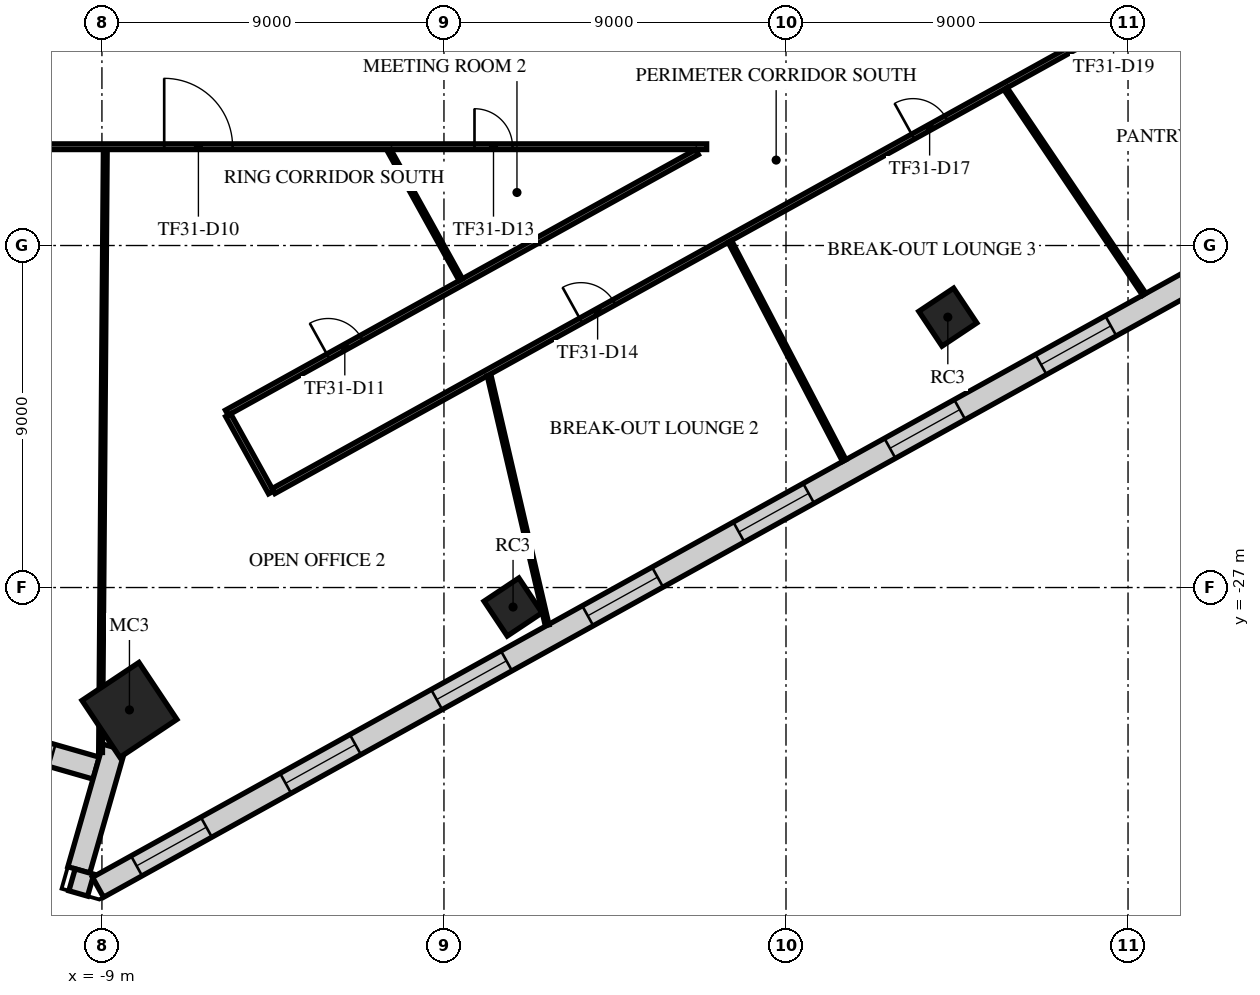
"""IFC4 building model, lengths in metres.
Left out: names, types, materials, properties, quantities, classifications, styles, units other than length and angle.
Written with IfcOpenShell. Run it as: python <this file> out.ifc"""

import sys

from ifc_helpers import new_model, si_unit, direction, frame, frame_2d, origin, origin_2d, place, context, subcontext, project, spatial, rectangle, extrude, element, fill, save


model = new_model("IFC4")
c1 = context("Model", 3, precision=1e-05, world=origin(), true_north=direction((0.0, 1.0)))
c2 = subcontext(c1, "Body", "Model", "MODEL_VIEW")
j1 = project(units=[si_unit("LENGTHUNIT", "METRE"), si_unit("PLANEANGLEUNIT", "RADIAN")], contexts=[c1])
p1 = place(None, origin())
s1 = spatial("IfcSite", under=j1, at=p1, CompositionType="ELEMENT")
p2 = place(p1, origin())
s2 = spatial("IfcBuilding", under=s1, at=p2, CompositionType="ELEMENT")
p3 = place(p2, frame((0.0, 0.0, 135.7)))
s3 = spatial("IfcBuildingStorey", under=s2, at=p3, CompositionType="ELEMENT", Elevation=135.7)
p4 = place(p3, frame((-8.276, -30.221, -0.4), z_axis=(0.0, 0.0, 1.0), x_axis=(0.832028680356, 0.55473261583, 0.0)))
e1 = element("IfcColumn", 1, at=p4, inside=s3, PredefinedType="COLUMN", context=c2, shape_type="SweptSolid", body=[
    extrude(rectangle(XDim=1.8, YDim=1.8, at=origin_2d()), origin(), (0.0, 0.0, 1.0), 4.4),
])
for number, where, z_axis, x_axis in (
    (2, (1.818, -27.513, -0.4), (0.0, 0.0, 1.0), (0.832, 0.555, 0.0)),
    (3, (13.258, -19.885, -0.4), (0.0, 0.0, 1.0), (0.832, 0.555, 0.0)),
):
    element("IfcColumn", number, at=place(p3, frame(where, z_axis=z_axis, x_axis=x_axis)), inside=s3, PredefinedType="COLUMN", context=c2, shape_type="SweptSolid", body=[
        extrude(rectangle(XDim=1.1, YDim=1.1, at=origin_2d()), origin(), (0.0, 0.0, 1.0), 4.4),
    ])
p5 = place(p3, frame((-13.958, -30.375, 0.0), z_axis=(0.0, 0.0, 1.0), x_axis=(0.961260009649, -0.275643236537, 0.0)))
e4 = element("IfcWall", 4, at=p5, inside=s3, PredefinedType="STANDARD", context=c2, shape_type="SweptSolid", body=[
    extrude(rectangle(XDim=5.0, YDim=0.6, at=frame_2d((2.5, 0.0))), origin(), (0.0, 0.0, 1.0), 3.6),
])
p6 = place(p5, frame((1.2, 0.0, 0.9)))
e5 = element("IfcOpeningElement", 5, at=p6, cuts=e4, PredefinedType="OPENING", context=c2, shape_type="SweptSolid", body=[
    extrude(rectangle(XDim=2.6, YDim=2.1, at=frame_2d((1.3, 1.05))), frame((0.0, 0.31, 0.0), z_axis=(0.0, -1.0, 0.0), x_axis=(1.0, 0.0, 0.0)), (0.0, 0.0, 1.0), 0.62),
])
p7 = place(p3, frame((-8.683, -31.205, 0.0), z_axis=(0.0, 0.0, 1.0), x_axis=(-0.275672311862, -0.961251671766, 0.0)))
e6 = element("IfcWall", 6, at=p7, inside=s3, PredefinedType="STANDARD", context=c2, shape_type="SweptSolid", body=[
    extrude(rectangle(XDim=3.356, YDim=0.6, at=frame_2d((1.678, 0.0))), origin(), (0.0, 0.0, 1.0), 3.6),
])
p8 = place(p3, frame((-9.787, -34.691, 0.0), z_axis=(0.0, 0.0, 1.0), x_axis=(0.96119910246, -0.275855551749, 0.0)))
e7 = element("IfcWall", 7, at=p8, inside=s3, PredefinedType="STANDARD", context=c2, shape_type="SweptSolid", body=[
    extrude(rectangle(XDim=0.511, YDim=0.6, at=frame_2d((0.256, 0.0))), origin(), (0.0, 0.0, 1.0), 3.6),
])
p9 = place(p3, frame((-9.103, -34.888, 0.0), z_axis=(0.0, 0.0, 1.0), x_axis=(0.874618897425, 0.484811081007, 0.0)))
e8 = element("IfcWall", 8, at=p9, inside=s3, PredefinedType="STANDARD", context=c2, shape_type="SweptSolid", body=[
    extrude(rectangle(XDim=49.751, YDim=0.6, at=frame_2d((24.876, 0.0))), origin(), (0.0, 0.0, 1.0), 3.6),
])
p10 = place(p9, frame((1.161, 0.0, 0.9)))
e9 = element("IfcOpeningElement", 9, at=p10, cuts=e8, PredefinedType="OPENING", context=c2, shape_type="SweptSolid", body=[
    extrude(rectangle(XDim=2.1, YDim=2.1, at=frame_2d((1.05, 1.05))), frame((0.0, 0.31, 0.0), z_axis=(0.0, -1.0, 0.0), x_axis=(1.0, 0.0, 0.0)), (0.0, 0.0, 1.0), 0.62),
])
p11 = place(p9, frame((5.644, 0.0, 0.9)))
e10 = element("IfcOpeningElement", 10, at=p11, cuts=e8, PredefinedType="OPENING", context=c2, shape_type="SweptSolid", body=[
    extrude(rectangle(XDim=2.1, YDim=2.1, at=frame_2d((1.05, 1.05))), frame((0.0, 0.31, 0.0), z_axis=(0.0, -1.0, 0.0), x_axis=(1.0, 0.0, 0.0)), (0.0, 0.0, 1.0), 0.62),
])
p12 = place(p9, frame((10.189, 0.0, 0.9)))
e11 = element("IfcOpeningElement", 11, at=p12, cuts=e8, PredefinedType="OPENING", context=c2, shape_type="SweptSolid", body=[
    extrude(rectangle(XDim=2.1, YDim=2.1, at=frame_2d((1.05, 1.05))), frame((0.0, 0.31, 0.0), z_axis=(0.0, -1.0, 0.0), x_axis=(1.0, 0.0, 0.0)), (0.0, 0.0, 1.0), 0.62),
])
p13 = place(p9, frame((14.735, 0.0, 0.9)))
e12 = element("IfcOpeningElement", 12, at=p13, cuts=e8, PredefinedType="OPENING", context=c2, shape_type="SweptSolid", body=[
    extrude(rectangle(XDim=2.1, YDim=2.1, at=frame_2d((1.05, 1.05))), frame((0.0, 0.31, 0.0), z_axis=(0.0, -1.0, 0.0), x_axis=(1.0, 0.0, 0.0)), (0.0, 0.0, 1.0), 0.62),
])
p14 = place(p9, frame((19.28, 0.0, 0.9)))
e13 = element("IfcOpeningElement", 13, at=p14, cuts=e8, PredefinedType="OPENING", context=c2, shape_type="SweptSolid", body=[
    extrude(rectangle(XDim=2.1, YDim=2.1, at=frame_2d((1.05, 1.05))), frame((0.0, 0.31, 0.0), z_axis=(0.0, -1.0, 0.0), x_axis=(1.0, 0.0, 0.0)), (0.0, 0.0, 1.0), 0.62),
])
p15 = place(p9, frame((23.826, 0.0, 0.9)))
e14 = element("IfcOpeningElement", 14, at=p15, cuts=e8, PredefinedType="OPENING", context=c2, shape_type="SweptSolid", body=[
    extrude(rectangle(XDim=2.1, YDim=2.1, at=frame_2d((1.05, 1.05))), frame((0.0, 0.31, 0.0), z_axis=(0.0, -1.0, 0.0), x_axis=(1.0, 0.0, 0.0)), (0.0, 0.0, 1.0), 0.62),
])
p16 = place(p9, frame((28.371, 0.0, 0.9)))
e15 = element("IfcOpeningElement", 15, at=p16, cuts=e8, PredefinedType="OPENING", context=c2, shape_type="SweptSolid", body=[
    extrude(rectangle(XDim=2.1, YDim=2.1, at=frame_2d((1.05, 1.05))), frame((0.0, 0.31, 0.0), z_axis=(0.0, -1.0, 0.0), x_axis=(1.0, 0.0, 0.0)), (0.0, 0.0, 1.0), 0.62),
])
p17 = place(p9, frame((32.917, 0.0, 0.9)))
e16 = element("IfcOpeningElement", 16, at=p17, cuts=e8, PredefinedType="OPENING", context=c2, shape_type="SweptSolid", body=[
    extrude(rectangle(XDim=2.1, YDim=2.1, at=frame_2d((1.05, 1.05))), frame((0.0, 0.31, 0.0), z_axis=(0.0, -1.0, 0.0), x_axis=(1.0, 0.0, 0.0)), (0.0, 0.0, 1.0), 0.62),
])
p18 = place(p9, frame((37.462, 0.0, 0.9)))
e17 = element("IfcOpeningElement", 17, at=p18, cuts=e8, PredefinedType="OPENING", context=c2, shape_type="SweptSolid", body=[
    extrude(rectangle(XDim=2.1, YDim=2.1, at=frame_2d((1.05, 1.05))), frame((0.0, 0.31, 0.0), z_axis=(0.0, -1.0, 0.0), x_axis=(1.0, 0.0, 0.0)), (0.0, 0.0, 1.0), 0.62),
])
p19 = place(p9, frame((42.008, 0.0, 0.9)))
e18 = element("IfcOpeningElement", 18, at=p19, cuts=e8, PredefinedType="OPENING", context=c2, shape_type="SweptSolid", body=[
    extrude(rectangle(XDim=2.1, YDim=2.1, at=frame_2d((1.05, 1.05))), frame((0.0, 0.31, 0.0), z_axis=(0.0, -1.0, 0.0), x_axis=(1.0, 0.0, 0.0)), (0.0, 0.0, 1.0), 0.62),
])
p20 = place(p9, frame((46.491, 0.0, 0.9)))
e19 = element("IfcOpeningElement", 19, at=p20, cuts=e8, PredefinedType="OPENING", context=c2, shape_type="SweptSolid", body=[
    extrude(rectangle(XDim=2.1, YDim=2.1, at=frame_2d((1.05, 1.05))), frame((0.0, 0.31, 0.0), z_axis=(0.0, -1.0, 0.0), x_axis=(1.0, 0.0, 0.0)), (0.0, 0.0, 1.0), 0.62),
])
p21 = place(p3, frame((-14.684, -15.4, 0.0), z_axis=(0.0, 0.0, 1.0), x_axis=(1.0, 0.0, 0.0)))
e20 = element("IfcWall", 20, at=p21, inside=s3, PredefinedType="PARTITIONING", context=c2, shape_type="SweptSolid", body=[
    extrude(rectangle(XDim=21.596, YDim=0.15, at=frame_2d((10.798, 0.0))), origin(), (0.0, 0.0, 1.0), 3.15),
])
p22 = place(p21, frame((7.322, 0.0, 0.0)))
e21 = element("IfcOpeningElement", 21, at=p22, cuts=e20, PredefinedType="OPENING", context=c2, shape_type="SweptSolid", body=[
    extrude(rectangle(XDim=1.8, YDim=2.1, at=frame_2d((0.9, 1.05))), frame((0.0, 0.085, 0.0), z_axis=(0.0, -1.0, 0.0), x_axis=(1.0, 0.0, 0.0)), (0.0, 0.0, 1.0), 0.17),
])
p23 = place(p21, frame((15.487, 0.0, 0.0)))
e22 = element("IfcOpeningElement", 22, at=p23, cuts=e20, PredefinedType="OPENING", context=c2, shape_type="SweptSolid", body=[
    extrude(rectangle(XDim=1.0, YDim=2.1, at=frame_2d((0.5, 1.05))), frame((0.0, 0.085, 0.0), z_axis=(0.0, -1.0, 0.0), x_axis=(1.0, 0.0, 0.0)), (0.0, 0.0, 1.0), 0.17),
])
p24 = place(p3, frame((-5.714, -22.399, 0.0), z_axis=(0.0, 0.0, 1.0), x_axis=(0.874614395079, 0.484819203334, 0.0)))
e23 = element("IfcWall", 23, at=p24, inside=s3, PredefinedType="PARTITIONING", context=c2, shape_type="SweptSolid", body=[
    extrude(rectangle(XDim=14.146, YDim=0.15, at=frame_2d((7.073, 0.0))), origin(), (0.0, 0.0, 1.0), 3.15),
])
p25 = place(p24, frame((3.05, 0.0, 0.0)))
e24 = element("IfcOpeningElement", 24, at=p25, cuts=e23, PredefinedType="OPENING", context=c2, shape_type="SweptSolid", body=[
    extrude(rectangle(XDim=1.0, YDim=2.1, at=frame_2d((0.5, 1.05))), frame((0.0, 0.085, 0.0), z_axis=(0.0, -1.0, 0.0), x_axis=(1.0, 0.0, 0.0)), (0.0, 0.0, 1.0), 0.17),
])
p26 = place(p3, frame((-5.677, -22.465, 0.0), z_axis=(0.0, 0.0, 1.0), x_axis=(0.484902784843, -0.874568058673, 0.0)))
e25 = element("IfcWall", 25, at=p26, inside=s3, PredefinedType="PARTITIONING", context=c2, shape_type="SweptSolid", body=[
    extrude(rectangle(XDim=2.325, YDim=0.15, at=frame_2d((1.163, 0.0))), origin(), (0.0, 0.0, 1.0), 3.6),
])
p27 = place(p3, frame((-4.484, -24.462, 0.0), z_axis=(0.0, 0.0, 1.0), x_axis=(0.874618059696, 0.484812592301, 0.0)))
e26 = element("IfcWall", 26, at=p27, inside=s3, PredefinedType="PARTITIONING", context=c2, shape_type="SweptSolid", body=[
    extrude(rectangle(XDim=31.638, YDim=0.15, at=frame_2d((15.819, 0.0))), origin(), (0.0, 0.0, 1.0), 3.15),
])
p28 = place(p27, frame((9.25, 0.0, 0.0)))
e27 = element("IfcOpeningElement", 27, at=p28, cuts=e26, PredefinedType="OPENING", context=c2, shape_type="SweptSolid", body=[
    extrude(rectangle(XDim=1.0, YDim=2.1, at=frame_2d((0.5, 1.05))), frame((0.0, 0.085, 0.0), z_axis=(0.0, -1.0, 0.0), x_axis=(1.0, 0.0, 0.0)), (0.0, 0.0, 1.0), 0.17),
])
p29 = place(p27, frame((19.239, 0.0, 0.0)))
e28 = element("IfcOpeningElement", 28, at=p29, cuts=e26, PredefinedType="OPENING", context=c2, shape_type="SweptSolid", body=[
    extrude(rectangle(XDim=1.0, YDim=2.1, at=frame_2d((0.5, 1.05))), frame((0.0, 0.085, 0.0), z_axis=(0.0, -1.0, 0.0), x_axis=(1.0, 0.0, 0.0)), (0.0, 0.0, 1.0), 0.17),
])
p30 = place(p27, frame((24.772, 0.0, 0.0)))
e29 = element("IfcOpeningElement", 29, at=p30, cuts=e26, PredefinedType="OPENING", context=c2, shape_type="SweptSolid", body=[
    extrude(rectangle(XDim=1.0, YDim=2.1, at=frame_2d((0.5, 1.05))), frame((0.0, 0.085, 0.0), z_axis=(0.0, -1.0, 0.0), x_axis=(1.0, 0.0, 0.0)), (0.0, 0.0, 1.0), 0.17),
])
p31 = place(p3, frame((-9.036, -31.34, 0.0), z_axis=(0.0, 0.0, 1.0), x_axis=(0.008145579251, 0.999966824219, 0.0)))
e30 = element("IfcWall", 30, at=p31, inside=s3, PredefinedType="PARTITIONING", context=c2, shape_type="SweptSolid", body=[
    extrude(rectangle(XDim=0.629, YDim=0.1, at=frame_2d((0.315, 0.0))), origin(), (0.0, 0.0, 1.0), 3.6),
])
p32 = place(p3, frame((-9.023, -29.637, 0.0), z_axis=(0.0, 0.0, 1.0), x_axis=(0.007843639619, 0.999969238186, 0.0)))
e31 = element("IfcWall", 31, at=p32, inside=s3, PredefinedType="PARTITIONING", context=c2, shape_type="SweptSolid", body=[
    extrude(rectangle(XDim=14.162, YDim=0.1, at=frame_2d((7.081, 0.0))), origin(), (0.0, 0.0, 1.0), 3.15),
])
p33 = place(p3, frame((-1.441, -15.499, 0.0), z_axis=(0.0, 0.0, 1.0), x_axis=(0.484661708709, -0.874701679495, 0.0)))
e32 = element("IfcWall", 32, at=p33, inside=s3, PredefinedType="PARTITIONING", context=c2, shape_type="SweptSolid", body=[
    extrude(rectangle(XDim=3.888, YDim=0.1, at=frame_2d((1.944, 0.0))), origin(), (0.0, 0.0, 1.0), 3.6),
])
p34 = place(p3, frame((1.188, -21.419, 0.0), z_axis=(0.0, 0.0, 1.0), x_axis=(0.226360220424, -0.974043659499, 0.0)))
e33 = element("IfcWall", 33, at=p34, inside=s3, PredefinedType="PARTITIONING", context=c2, shape_type="SweptSolid", body=[
    extrude(rectangle(XDim=6.747, YDim=0.1, at=frame_2d((3.374, 0.0))), origin(), (0.0, 0.0, 1.0), 3.03),
])
p35 = place(p3, frame((7.524, -17.893, 0.0), z_axis=(0.0, 0.0, 1.0), x_axis=(0.462569855846, -0.886582837902, 0.0)))
e34 = element("IfcWall", 34, at=p35, inside=s3, PredefinedType="PARTITIONING", context=c2, shape_type="SweptSolid", body=[
    extrude(rectangle(XDim=6.503, YDim=0.1, at=frame_2d((3.251, 0.0))), origin(), (0.0, 0.0, 1.0), 3.15),
])
p36 = place(p3, frame((14.778, -13.875, 0.0), z_axis=(0.0, 0.0, 1.0), x_axis=(0.559166197626, -0.829055585249, 0.0)))
e35 = element("IfcWall", 35, at=p36, inside=s3, PredefinedType="PARTITIONING", context=c2, shape_type="SweptSolid", body=[
    extrude(rectangle(XDim=6.523, YDim=0.1, at=frame_2d((3.261, 0.0))), origin(), (0.0, 0.0, 1.0), 3.15),
])
p37 = place(p6, origin())
e36 = element("IfcWindow", 36, at=p37, inside=s3, PartitioningType="SINGLE_PANEL", PredefinedType="WINDOW", context=c2, shape_type="SweptSolid", body=[
    extrude(rectangle(XDim=2.6, YDim=2.1, at=frame_2d((1.3, 1.05))), frame((0.0, 0.03, 0.0), z_axis=(0.0, -1.0, 0.0), x_axis=(1.0, 0.0, 0.0)), (0.0, 0.0, 1.0), 0.06),
])
fill(e5, e36)
p38 = place(p10, origin())
e37 = element("IfcWindow", 37, at=p38, inside=s3, PartitioningType="SINGLE_PANEL", PredefinedType="WINDOW", context=c2, shape_type="SweptSolid", body=[
    extrude(rectangle(XDim=2.1, YDim=2.1, at=frame_2d((1.05, 1.05))), frame((0.0, 0.03, 0.0), z_axis=(0.0, -1.0, 0.0), x_axis=(1.0, 0.0, 0.0)), (0.0, 0.0, 1.0), 0.06),
])
fill(e9, e37)
p39 = place(p11, origin())
e38 = element("IfcWindow", 38, at=p39, inside=s3, PartitioningType="SINGLE_PANEL", PredefinedType="WINDOW", context=c2, shape_type="SweptSolid", body=[
    extrude(rectangle(XDim=2.1, YDim=2.1, at=frame_2d((1.05, 1.05))), frame((0.0, 0.03, 0.0), z_axis=(0.0, -1.0, 0.0), x_axis=(1.0, 0.0, 0.0)), (0.0, 0.0, 1.0), 0.06),
])
fill(e10, e38)
p40 = place(p12, origin())
e39 = element("IfcWindow", 39, at=p40, inside=s3, PartitioningType="SINGLE_PANEL", PredefinedType="WINDOW", context=c2, shape_type="SweptSolid", body=[
    extrude(rectangle(XDim=2.1, YDim=2.1, at=frame_2d((1.05, 1.05))), frame((0.0, 0.03, 0.0), z_axis=(0.0, -1.0, 0.0), x_axis=(1.0, 0.0, 0.0)), (0.0, 0.0, 1.0), 0.06),
])
fill(e11, e39)
p41 = place(p13, origin())
e40 = element("IfcWindow", 40, at=p41, inside=s3, PartitioningType="SINGLE_PANEL", PredefinedType="WINDOW", context=c2, shape_type="SweptSolid", body=[
    extrude(rectangle(XDim=2.1, YDim=2.1, at=frame_2d((1.05, 1.05))), frame((0.0, 0.03, 0.0), z_axis=(0.0, -1.0, 0.0), x_axis=(1.0, 0.0, 0.0)), (0.0, 0.0, 1.0), 0.06),
])
fill(e12, e40)
p42 = place(p14, origin())
e41 = element("IfcWindow", 41, at=p42, inside=s3, PartitioningType="SINGLE_PANEL", PredefinedType="WINDOW", context=c2, shape_type="SweptSolid", body=[
    extrude(rectangle(XDim=2.1, YDim=2.1, at=frame_2d((1.05, 1.05))), frame((0.0, 0.03, 0.0), z_axis=(0.0, -1.0, 0.0), x_axis=(1.0, 0.0, 0.0)), (0.0, 0.0, 1.0), 0.06),
])
fill(e13, e41)
p43 = place(p15, origin())
e42 = element("IfcWindow", 42, at=p43, inside=s3, PartitioningType="SINGLE_PANEL", PredefinedType="WINDOW", context=c2, shape_type="SweptSolid", body=[
    extrude(rectangle(XDim=2.1, YDim=2.1, at=frame_2d((1.05, 1.05))), frame((0.0, 0.03, 0.0), z_axis=(0.0, -1.0, 0.0), x_axis=(1.0, 0.0, 0.0)), (0.0, 0.0, 1.0), 0.06),
])
fill(e14, e42)
p44 = place(p16, origin())
e43 = element("IfcWindow", 43, at=p44, inside=s3, PartitioningType="SINGLE_PANEL", PredefinedType="WINDOW", context=c2, shape_type="SweptSolid", body=[
    extrude(rectangle(XDim=2.1, YDim=2.1, at=frame_2d((1.05, 1.05))), frame((0.0, 0.03, 0.0), z_axis=(0.0, -1.0, 0.0), x_axis=(1.0, 0.0, 0.0)), (0.0, 0.0, 1.0), 0.06),
])
fill(e15, e43)
p45 = place(p22, frame((1.8, 0.0, 0.0), z_axis=(0.0, 0.0, 1.0), x_axis=(-1.0, 0.0, 0.0)))
e44 = element("IfcDoor", 44, at=p45, inside=s3, OperationType="DOUBLE_DOOR_SINGLE_SWING", PredefinedType="DOOR", context=c2, shape_type="SweptSolid", body=[
    extrude(rectangle(XDim=1.8, YDim=2.1, at=frame_2d((0.9, 1.05))), frame((0.0, 0.025, 0.0), z_axis=(0.0, -1.0, 0.0), x_axis=(1.0, 0.0, 0.0)), (0.0, 0.0, 1.0), 0.05),
])
fill(e21, e44)
p46 = place(p25, origin())
e45 = element("IfcDoor", 45, at=p46, inside=s3, OperationType="SINGLE_SWING_LEFT", PredefinedType="DOOR", context=c2, shape_type="SweptSolid", body=[
    extrude(rectangle(XDim=1.0, YDim=2.1, at=frame_2d((0.5, 1.05))), frame((0.0, 0.025, 0.0), z_axis=(0.0, -1.0, 0.0), x_axis=(1.0, 0.0, 0.0)), (0.0, 0.0, 1.0), 0.05),
])
fill(e24, e45)
p47 = place(p23, frame((1.0, 0.0, 0.0), z_axis=(0.0, 0.0, 1.0), x_axis=(-1.0, 0.0, 0.0)))
e46 = element("IfcDoor", 46, at=p47, inside=s3, OperationType="SINGLE_SWING_LEFT", PredefinedType="DOOR", context=c2, shape_type="SweptSolid", body=[
    extrude(rectangle(XDim=1.0, YDim=2.1, at=frame_2d((0.5, 1.05))), frame((0.0, 0.025, 0.0), z_axis=(0.0, -1.0, 0.0), x_axis=(1.0, 0.0, 0.0)), (0.0, 0.0, 1.0), 0.05),
])
fill(e22, e46)
p48 = place(p28, frame((1.0, 0.0, 0.0), z_axis=(0.0, 0.0, 1.0), x_axis=(-1.0, 0.0, 0.0)))
e47 = element("IfcDoor", 47, at=p48, inside=s3, OperationType="SINGLE_SWING_RIGHT", PredefinedType="DOOR", context=c2, shape_type="SweptSolid", body=[
    extrude(rectangle(XDim=1.0, YDim=2.1, at=frame_2d((0.5, 1.05))), frame((0.0, 0.025, 0.0), z_axis=(0.0, -1.0, 0.0), x_axis=(1.0, 0.0, 0.0)), (0.0, 0.0, 1.0), 0.05),
])
fill(e27, e47)
p49 = place(p29, frame((1.0, 0.0, 0.0), z_axis=(0.0, 0.0, 1.0), x_axis=(-1.0, 0.0, 0.0)))
e48 = element("IfcDoor", 48, at=p49, inside=s3, OperationType="SINGLE_SWING_RIGHT", PredefinedType="DOOR", context=c2, shape_type="SweptSolid", body=[
    extrude(rectangle(XDim=1.0, YDim=2.1, at=frame_2d((0.5, 1.05))), frame((0.0, 0.025, 0.0), z_axis=(0.0, -1.0, 0.0), x_axis=(1.0, 0.0, 0.0)), (0.0, 0.0, 1.0), 0.05),
])
fill(e28, e48)
save(model, sys.argv[1])
